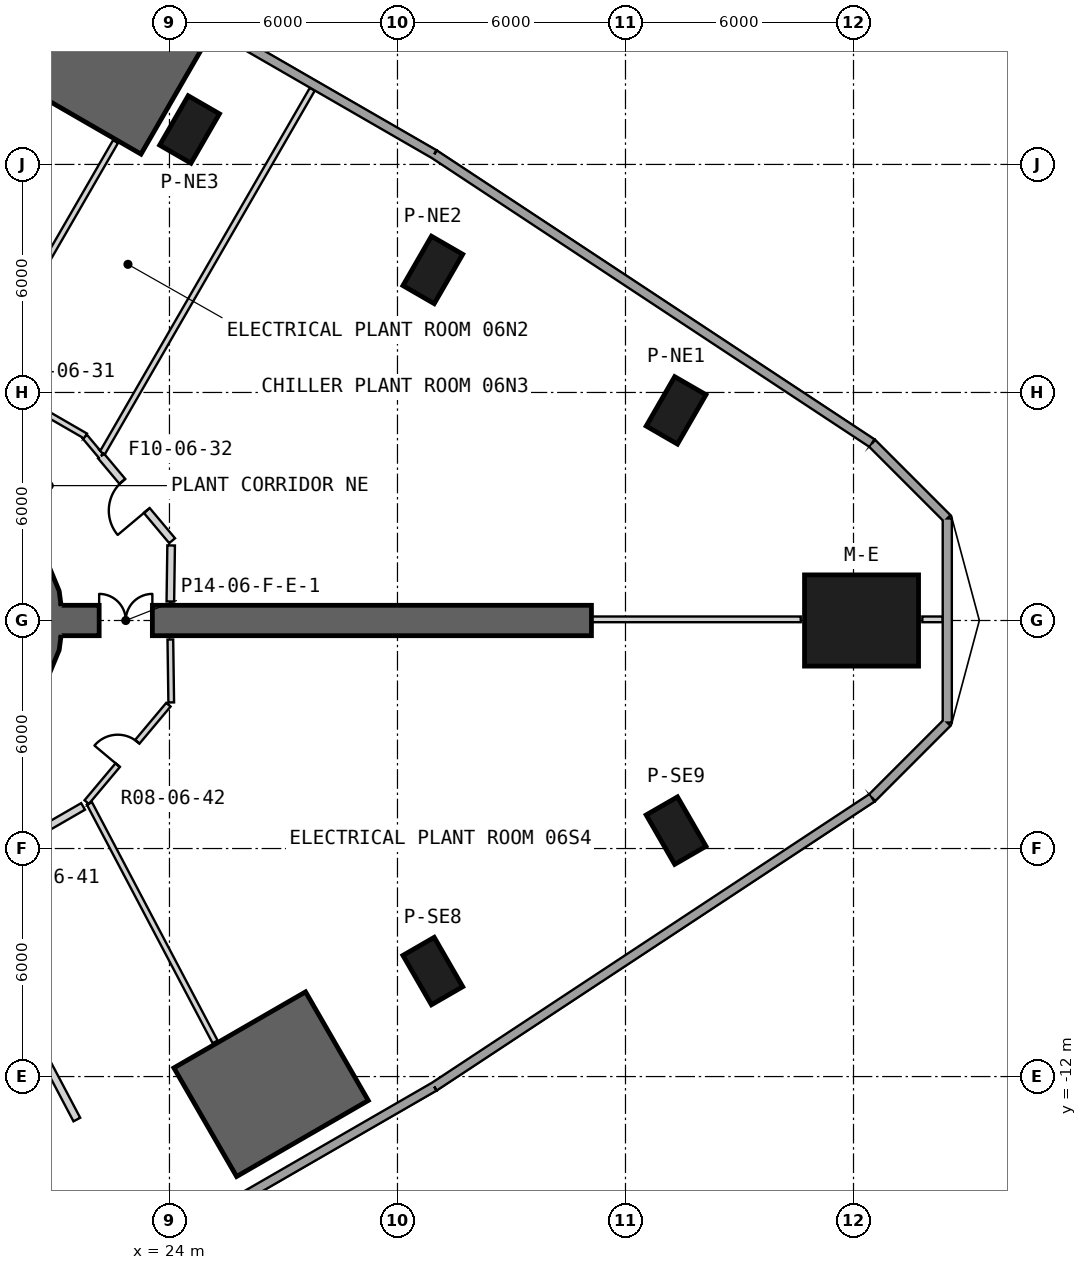
"""IFC4 building model, lengths in metres.
Left out: names, types, materials, properties, quantities, classifications, styles, units other than length and angle.
Written with IfcOpenShell. Run it as: python <this file> out.ifc"""

import sys

from ifc_helpers import new_model, si_unit, direction, frame, frame_2d, origin, origin_2d, place, context, subcontext, project, spatial, polyline, rectangle, outline, extrude, element, fill, save


model = new_model("IFC4")
c1 = context("Model", 3, precision=1e-05, world=origin(), true_north=direction((0.0, 1.0)))
c2 = subcontext(c1, "Body", "Model", "MODEL_VIEW")
j1 = project(units=[si_unit("LENGTHUNIT", "METRE"), si_unit("PLANEANGLEUNIT", "RADIAN")], contexts=[c1])
p1 = place(None, origin())
s1 = spatial("IfcSite", under=j1, at=p1, CompositionType="ELEMENT")
p2 = place(p1, origin())
s2 = spatial("IfcBuilding", under=s1, at=p2, CompositionType="ELEMENT")
p3 = place(p2, frame((0.0, 0.0, 39.5)))
s3 = spatial("IfcBuildingStorey", under=s2, at=p3, CompositionType="ELEMENT", Elevation=39.5)
p4 = place(p3, frame((42.211, 0.0, 0.0), z_axis=(0.0, 0.0, 1.0), x_axis=(1.0, 0.0, 0.0)))
e1 = element("IfcColumn", 1, at=p4, inside=s3, PredefinedType="COLUMN", context=c2, shape_type="SweptSolid", body=[
    extrude(rectangle(XDim=3.0, YDim=2.4, at=origin_2d()), origin(), (0.0, 0.0, 1.0), 5.7),
])
for number, where, z_axis, x_axis in (
    (2, (37.331, 5.528, 0.0), (0.0, 0.0, 1.0), (0.5, 0.866, 0.0)),
    (3, (30.93, 9.224, 0.0), (0.0, 0.0, 1.0), (0.5, 0.866, 0.0)),
    (4, (24.529, 12.92, 0.0), (0.0, 0.0, 1.0), (0.5, 0.866, 0.0)),
    (5, (30.93, -9.224, 0.0), (0.0, 0.0, 1.0), (0.5, -0.866, 0.0)),
    (6, (37.331, -5.528, 0.0), (0.0, 0.0, 1.0), (0.5, -0.866, 0.0)),
):
    element("IfcColumn", number, at=place(p3, frame(where, z_axis=z_axis, x_axis=x_axis)), inside=s3, PredefinedType="COLUMN", context=c2, shape_type="SweptSolid", body=[
        extrude(rectangle(XDim=1.5, YDim=0.95, at=origin_2d()), origin(), (0.0, 0.0, 1.0), 5.7),
    ])
p5 = place(p3, origin())
e7 = element("IfcWall", 7, at=p5, inside=s3, PredefinedType="SHEAR", context=c2, shape_type="SweptSolid", body=[
    extrude(outline(polyline([(19.7, -2.598), (20.321, -2.121), (20.798, -1.5), (21.098, -0.777), (21.2, 0.0), (21.098, 0.777), (20.798, 1.5), (20.321, 2.121), (19.7, 2.598), (19.25, 1.819), (19.685, 1.485), (20.019, 1.05), (20.229, 0.543), (20.3, 0.0), (20.229, -0.543), (20.019, -1.05), (19.685, -1.485), (19.25, -1.819), (19.7, -2.598)])), origin(), (0.0, 0.0, 1.0), 6.0),
])
p6 = place(p3, frame((21.15, 0.0, 0.0), z_axis=(0.0, 0.0, 1.0), x_axis=(1.0, 0.0, 0.0)))
e8 = element("IfcWall", 8, at=p6, inside=s3, PredefinedType="SHEAR", context=c2, shape_type="SweptSolid", body=[
    extrude(rectangle(XDim=13.954, YDim=0.8, at=frame_2d((6.977, 0.0))), origin(), (0.0, 0.0, 1.0), 6.0),
])
p7 = place(p6, frame((1.0, 0.0, 0.0)))
e9 = element("IfcOpeningElement", 9, at=p7, cuts=e8, PredefinedType="OPENING", context=c2, shape_type="SweptSolid", body=[
    extrude(rectangle(XDim=1.4, YDim=2.4, at=frame_2d((0.7, 1.2))), frame((0.0, 0.41, 0.0), z_axis=(0.0, -1.0, 0.0), x_axis=(1.0, 0.0, 0.0)), (0.0, 0.0, 1.0), 0.82),
])
p8 = place(p3, origin())
e10 = element("IfcWall", 10, at=p8, inside=s3, PredefinedType="SHEAR", context=c2, shape_type="SweptSolid", body=[
    extrude(outline(polyline([(25.767, -14.63), (29.231, -12.63), (27.581, -9.772), (24.117, -11.772), (25.767, -14.63)])), origin(), (0.0, 0.0, 1.0), 5.7),
])
p9 = place(p3, origin())
e11 = element("IfcWall", 11, at=p9, inside=s3, PredefinedType="SHEAR", context=c2, shape_type="SweptSolid", body=[
    extrude(outline(polyline([(24.901, 15.13), (21.437, 17.13), (19.787, 14.272), (23.251, 12.272), (24.901, 15.13)])), origin(), (0.0, 0.0, 1.0), 5.7),
])
p10 = place(p3, frame((42.487, 4.666, 0.0), z_axis=(0.0, 0.0, 1.0), x_axis=(-0.834569880428, 0.550902091739, 0.0)))
e12 = element("IfcWall", 12, at=p10, inside=s3, PredefinedType="SOLIDWALL", context=c2, shape_type="SweptSolid", body=[
    extrude(rectangle(XDim=13.802, YDim=0.24, at=frame_2d((6.901, 0.0))), origin(), (0.0, 0.0, 1.0), 5.7),
])
p11 = place(p3, frame((30.969, 12.269, 0.0), z_axis=(0.0, 0.0, 1.0), x_axis=(-0.866060590604, 0.499939049688, 0.0)))
e13 = element("IfcWall", 13, at=p11, inside=s3, PredefinedType="SOLIDWALL", context=c2, shape_type="SweptSolid", body=[
    extrude(rectangle(XDim=41.371, YDim=0.24, at=frame_2d((20.686, 0.0))), origin(), (0.0, 0.0, 1.0), 5.7),
])
p12 = place(p3, frame((-4.859, -32.954, 0.0), z_axis=(0.0, 0.0, 1.0), x_axis=(0.865991780246, 0.500058233156, 0.0)))
e14 = element("IfcWall", 14, at=p12, inside=s3, PredefinedType="SOLIDWALL", context=c2, shape_type="SweptSolid", body=[
    extrude(rectangle(XDim=41.371, YDim=0.24, at=frame_2d((20.685, 0.0))), origin(), (0.0, 0.0, 1.0), 5.7),
])
p13 = place(p3, frame((30.968, -12.267, 0.0), z_axis=(0.0, 0.0, 1.0), x_axis=(0.834683405501, 0.550730072342, 0.0)))
e15 = element("IfcWall", 15, at=p13, inside=s3, PredefinedType="SOLIDWALL", context=c2, shape_type="SweptSolid", body=[
    extrude(rectangle(XDim=13.801, YDim=0.24, at=frame_2d((6.901, 0.0))), origin(), (0.0, 0.0, 1.0), 5.7),
])
p14 = place(p3, frame((42.487, -4.666, 0.0), z_axis=(0.0, 0.0, 1.0), x_axis=(0.707106781187, 0.707106781187, 0.0)))
e16 = element("IfcWall", 16, at=p14, inside=s3, PredefinedType="SOLIDWALL", context=c2, shape_type="SweptSolid", body=[
    extrude(rectangle(XDim=2.801, YDim=0.24, at=frame_2d((1.4, 0.0))), origin(), (0.0, 0.0, 1.0), 5.7),
])
p15 = place(p3, frame((44.468, -2.686, 0.0), z_axis=(0.0, 0.0, 1.0), x_axis=(0.0, 1.0, 0.0)))
e17 = element("IfcWall", 17, at=p15, inside=s3, PredefinedType="SOLIDWALL", context=c2, shape_type="SweptSolid", body=[
    extrude(rectangle(XDim=5.371, YDim=0.24, at=frame_2d((2.686, 0.0))), origin(), (0.0, 0.0, 1.0), 5.7),
])
p16 = place(p3, frame((44.468, 2.686, 0.0), z_axis=(0.0, 0.0, 1.0), x_axis=(-0.707106781187, 0.707106781187, 0.0)))
e18 = element("IfcWall", 18, at=p16, inside=s3, PredefinedType="SOLIDWALL", context=c2, shape_type="SweptSolid", body=[
    extrude(rectangle(XDim=2.801, YDim=0.24, at=frame_2d((1.4, 0.0))), origin(), (0.0, 0.0, 1.0), 5.7),
])
p17 = place(p3, frame((21.792, 4.854, 0.0), z_axis=(0.0, 0.0, 1.0), x_axis=(-0.86603554589, 0.499982432947, 0.0)))
e19 = element("IfcWall", 19, at=p17, inside=s3, PredefinedType="PLUMBINGWALL", context=c2, shape_type="SweptSolid", body=[
    extrude(rectangle(XDim=3.197, YDim=0.15, at=frame_2d((1.599, 0.0))), origin(), (0.0, 0.0, 1.0), 4.88),
])
p18 = place(p17, frame((1.275, 0.0, 0.0)))
e20 = element("IfcOpeningElement", 20, at=p18, cuts=e19, PredefinedType="OPENING", context=c2, shape_type="SweptSolid", body=[
    extrude(rectangle(XDim=0.8, YDim=2.1, at=frame_2d((0.4, 1.05))), frame((0.0, 0.085, 0.0), z_axis=(0.0, -1.0, 0.0), x_axis=(1.0, 0.0, 0.0)), (0.0, 0.0, 1.0), 0.17),
])
p19 = place(p3, frame((22.198, 4.33, 0.0), z_axis=(0.0, 0.0, 1.0), x_axis=(-0.642696485047, 0.766120896535, 0.0)))
e21 = element("IfcWall", 21, at=p19, inside=s3, PredefinedType="PLUMBINGWALL", context=c2, shape_type="SweptSolid", body=[
    extrude(rectangle(XDim=0.659, YDim=0.15, at=frame_2d((0.329, 0.0))), origin(), (0.0, 0.0, 1.0), 5.7),
])
p20 = place(p3, frame((24.07, 2.099, 0.0), z_axis=(0.0, 0.0, 1.0), x_axis=(-0.642786909483, 0.766045030659, 0.0)))
e22 = element("IfcWall", 22, at=p20, inside=s3, PredefinedType="PARTITIONING", context=c2, shape_type="SweptSolid", body=[
    extrude(rectangle(XDim=2.912, YDim=0.2, at=frame_2d((1.456, 0.0))), origin(), (0.0, 0.0, 1.0), 4.78),
])
p21 = place(p20, frame((1.037, 0.0, 0.0)))
e23 = element("IfcOpeningElement", 23, at=p21, cuts=e22, PredefinedType="OPENING", context=c2, shape_type="SweptSolid", body=[
    extrude(rectangle(XDim=1.0, YDim=2.1, at=frame_2d((0.5, 1.05))), frame((0.0, 0.11, 0.0), z_axis=(0.0, -1.0, 0.0), x_axis=(1.0, 0.0, 0.0)), (0.0, 0.0, 1.0), 0.22),
])
p22 = place(p3, frame((24.023, 0.5, 0.0), z_axis=(0.0, 0.0, 1.0), x_axis=(0.014069125496, 0.999901024956, 0.0)))
e24 = element("IfcWall", 24, at=p22, inside=s3, PredefinedType="PARTITIONING", context=c2, shape_type="SweptSolid", body=[
    extrude(rectangle(XDim=1.475, YDim=0.2, at=frame_2d((0.738, 0.0))), origin(), (0.0, 0.0, 1.0), 5.7),
])
p23 = place(p3, frame((22.581, 12.601, 0.0), z_axis=(0.0, 0.0, 1.0), x_axis=(-0.500012147621, -0.866018390239, 0.0)))
e25 = element("IfcWall", 25, at=p23, inside=s3, PredefinedType="PLUMBINGWALL", context=c2, shape_type="SweptSolid", body=[
    extrude(rectangle(XDim=7.003, YDim=0.15, at=frame_2d((3.501, 0.0))), origin(), (0.0, 0.0, 1.0), 4.88),
])
p24 = place(p3, frame((27.759, 13.978, 0.0), z_axis=(0.0, 0.0, 1.0), x_axis=(-0.500006715255, -0.866021526696, 0.0)))
e26 = element("IfcWall", 26, at=p24, inside=s3, PredefinedType="PLUMBINGWALL", context=c2, shape_type="SweptSolid", body=[
    extrude(rectangle(XDim=11.052, YDim=0.15, at=frame_2d((5.526, 0.0))), origin(), (0.0, 0.0, 1.0), 4.88),
])
p25 = place(p3, frame((35.104, 0.03, 0.0), z_axis=(0.0, 0.0, 1.0), x_axis=(1.0, 0.0, 0.0)))
e27 = element("IfcWall", 27, at=p25, inside=s3, PredefinedType="PLUMBINGWALL", context=c2, shape_type="SweptSolid", body=[
    extrude(rectangle(XDim=5.507, YDim=0.15, at=frame_2d((2.754, 0.0))), origin(), (0.0, 0.0, 1.0), 5.27),
])
p26 = place(p3, frame((43.811, 0.03, 0.0), z_axis=(0.0, 0.0, 1.0), x_axis=(1.0, 0.0, 0.0)))
e28 = element("IfcWall", 28, at=p26, inside=s3, PredefinedType="PLUMBINGWALL", context=c2, shape_type="SweptSolid", body=[
    extrude(rectangle(XDim=0.536, YDim=0.15, at=frame_2d((0.268, 0.0))), origin(), (0.0, 0.0, 1.0), 5.7),
])
p27 = place(p3, frame((3.8, -15.242, 0.0), z_axis=(0.0, 0.0, 1.0), x_axis=(0.866025905383, 0.499999131204, 0.0)))
e29 = element("IfcWall", 29, at=p27, inside=s3, PredefinedType="PARTITIONING", context=c2, shape_type="SweptSolid", body=[
    extrude(rectangle(XDim=20.7, YDim=0.2, at=frame_2d((10.35, 0.0))), origin(), (0.0, 0.0, 1.0), 4.88),
])
p28 = place(p27, frame((1.636, 0.0, 0.0)))
e30 = element("IfcOpeningElement", 30, at=p28, cuts=e29, PredefinedType="OPENING", context=c2, shape_type="SweptSolid", body=[
    extrude(rectangle(XDim=1.0, YDim=2.1, at=frame_2d((0.5, 1.05))), frame((0.0, 0.11, 0.0), z_axis=(0.0, -1.0, 0.0), x_axis=(1.0, 0.0, 0.0)), (0.0, 0.0, 1.0), 0.22),
])
p29 = place(p27, frame((5.812, 0.0, 0.0)))
e31 = element("IfcOpeningElement", 31, at=p29, cuts=e29, PredefinedType="OPENING", context=c2, shape_type="SweptSolid", body=[
    extrude(rectangle(XDim=1.0, YDim=2.1, at=frame_2d((0.5, 1.05))), frame((0.0, 0.11, 0.0), z_axis=(0.0, -1.0, 0.0), x_axis=(1.0, 0.0, 0.0)), (0.0, 0.0, 1.0), 0.22),
])
p30 = place(p27, frame((9.987, 0.0, 0.0)))
e32 = element("IfcOpeningElement", 32, at=p30, cuts=e29, PredefinedType="OPENING", context=c2, shape_type="SweptSolid", body=[
    extrude(rectangle(XDim=1.0, YDim=2.1, at=frame_2d((0.5, 1.05))), frame((0.0, 0.11, 0.0), z_axis=(0.0, -1.0, 0.0), x_axis=(1.0, 0.0, 0.0)), (0.0, 0.0, 1.0), 0.22),
])
p31 = place(p27, frame((14.162, 0.0, 0.0)))
e33 = element("IfcOpeningElement", 33, at=p31, cuts=e29, PredefinedType="OPENING", context=c2, shape_type="SweptSolid", body=[
    extrude(rectangle(XDim=1.0, YDim=2.1, at=frame_2d((0.5, 1.05))), frame((0.0, 0.11, 0.0), z_axis=(0.0, -1.0, 0.0), x_axis=(1.0, 0.0, 0.0)), (0.0, 0.0, 1.0), 0.22),
])
p32 = place(p27, frame((18.138, 0.0, 0.0)))
e34 = element("IfcOpeningElement", 34, at=p32, cuts=e29, PredefinedType="OPENING", context=c2, shape_type="SweptSolid", body=[
    extrude(rectangle(XDim=1.0, YDim=2.1, at=frame_2d((0.5, 1.05))), frame((0.0, 0.11, 0.0), z_axis=(0.0, -1.0, 0.0), x_axis=(1.0, 0.0, 0.0)), (0.0, 0.0, 1.0), 0.22),
])
p33 = place(p3, frame((24.047, -2.156, 0.0), z_axis=(0.0, 0.0, 1.0), x_axis=(-0.014153698586, 0.999899831391, 0.0)))
e35 = element("IfcWall", 35, at=p33, inside=s3, PredefinedType="PLUMBINGWALL", context=c2, shape_type="SweptSolid", body=[
    extrude(rectangle(XDim=1.656, YDim=0.15, at=frame_2d((0.828, 0.0))), origin(), (0.0, 0.0, 1.0), 5.7),
])
p34 = place(p3, frame((21.822, -4.778, 0.0), z_axis=(0.0, 0.0, 1.0), x_axis=(0.642779483679, 0.766051261575, 0.0)))
e36 = element("IfcWall", 36, at=p34, inside=s3, PredefinedType="PLUMBINGWALL", context=c2, shape_type="SweptSolid", body=[
    extrude(rectangle(XDim=3.345, YDim=0.15, at=frame_2d((1.672, 0.0))), origin(), (0.0, 0.0, 1.0), 4.78),
])
p35 = place(p34, frame((1.271, 0.0, 0.0)))
e37 = element("IfcOpeningElement", 37, at=p35, cuts=e36, PredefinedType="OPENING", context=c2, shape_type="SweptSolid", body=[
    extrude(rectangle(XDim=0.8, YDim=2.1, at=frame_2d((0.4, 1.05))), frame((0.0, 0.085, 0.0), z_axis=(0.0, -1.0, 0.0), x_axis=(1.0, 0.0, 0.0)), (0.0, 0.0, 1.0), 0.17),
])
p36 = place(p3, frame((18.317, -6.976, 0.0), z_axis=(0.0, 0.0, 1.0), x_axis=(0.4663926901, -0.884577785512, 0.0)))
e38 = element("IfcWall", 38, at=p36, inside=s3, PredefinedType="PARTITIONING", context=c2, shape_type="SweptSolid", body=[
    extrude(rectangle(XDim=6.958, YDim=0.2, at=frame_2d((3.479, 0.0))), origin(), (0.0, 0.0, 1.0), 4.88),
])
p37 = place(p3, frame((21.892, -4.811, 0.0), z_axis=(0.0, 0.0, 1.0), x_axis=(0.466418462384, -0.884564196623, 0.0)))
e39 = element("IfcWall", 39, at=p37, inside=s3, PredefinedType="PLUMBINGWALL", context=c2, shape_type="SweptSolid", body=[
    extrude(rectangle(XDim=7.096, YDim=0.15, at=frame_2d((3.548, 0.0))), origin(), (0.0, 0.0, 1.0), 4.88),
])
p38 = place(p21, origin())
e40 = element("IfcDoor", 40, at=p38, inside=s3, OperationType="SINGLE_SWING_LEFT", PredefinedType="USERDEFINED", context=c2, shape_type="SweptSolid", body=[
    extrude(rectangle(XDim=1.0, YDim=2.1, at=frame_2d((0.5, 1.05))), frame((0.0, 0.025, 0.0), z_axis=(0.0, -1.0, 0.0), x_axis=(1.0, 0.0, 0.0)), (0.0, 0.0, 1.0), 0.05),
])
fill(e23, e40)
p39 = place(p35, origin())
e41 = element("IfcDoor", 41, at=p39, inside=s3, OperationType="SINGLE_SWING_LEFT", PredefinedType="USERDEFINED", context=c2, shape_type="SweptSolid", body=[
    extrude(rectangle(XDim=0.8, YDim=2.1, at=frame_2d((0.4, 1.05))), frame((0.0, 0.025, 0.0), z_axis=(0.0, -1.0, 0.0), x_axis=(1.0, 0.0, 0.0)), (0.0, 0.0, 1.0), 0.05),
])
fill(e37, e41)
p40 = place(p7, origin())
e42 = element("IfcDoor", 42, at=p40, inside=s3, OperationType="DOUBLE_DOOR_SINGLE_SWING", PredefinedType="NOTDEFINED", context=c2, shape_type="SweptSolid", body=[
    extrude(rectangle(XDim=1.4, YDim=2.4, at=frame_2d((0.7, 1.2))), frame((0.0, 0.025, 0.0), z_axis=(0.0, -1.0, 0.0), x_axis=(1.0, 0.0, 0.0)), (0.0, 0.0, 1.0), 0.05),
])
fill(e9, e42)
save(model, sys.argv[1])
